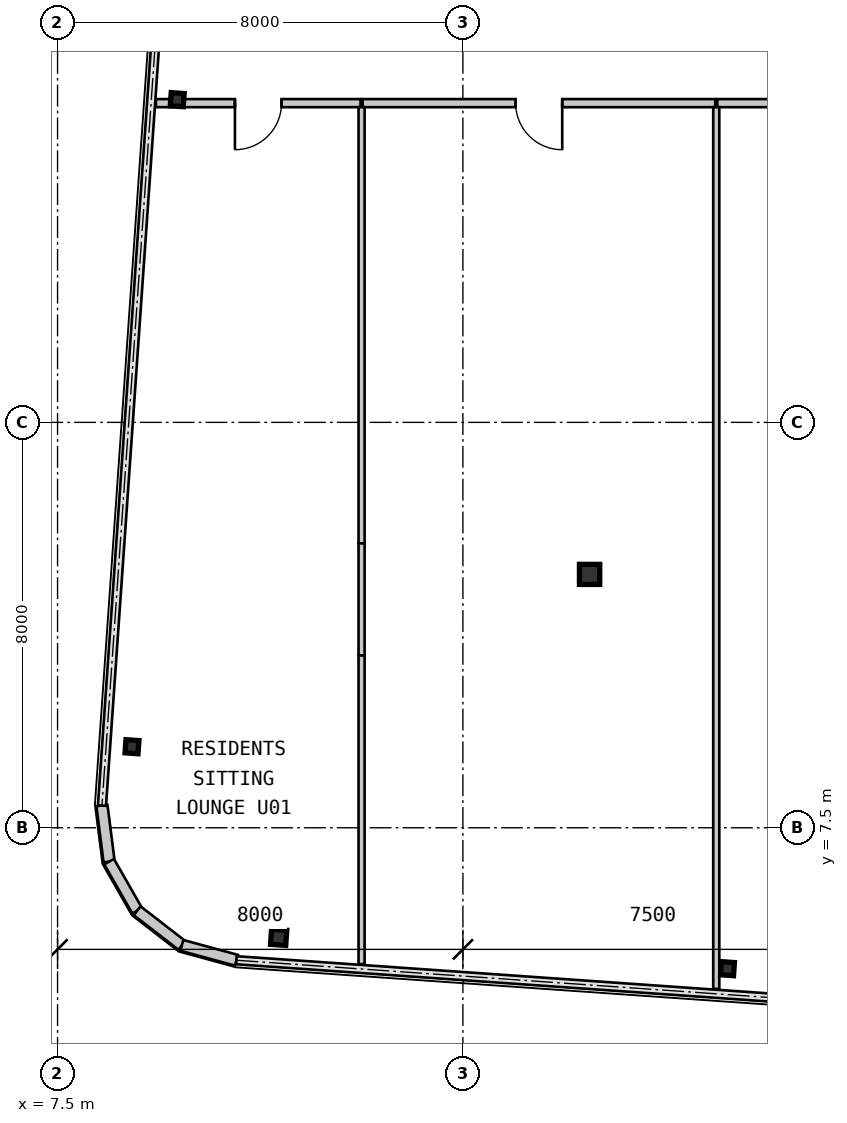
"""IFC4 building model, lengths in metres.
Left out: names, types, materials, properties, quantities, classifications, styles, units other than length and angle.
Written with IfcOpenShell. Run it as: python <this file> out.ifc"""

import sys

from ifc_helpers import new_model, si_unit, direction, frame, frame_2d, origin, origin_2d, place, context, subcontext, project, spatial, rectangle, hollow_rectangle, i_section, extrude, source, transform, mapped, element, fill, save


model = new_model("IFC4")
c1 = context("Model", 3, precision=1e-05, world=origin(), true_north=direction((0.0, 1.0)))
c2 = subcontext(c1, "Body", "Model", "MODEL_VIEW")
j1 = project(units=[si_unit("LENGTHUNIT", "METRE"), si_unit("PLANEANGLEUNIT", "RADIAN")], contexts=[c1])
p1 = place(None, origin())
s1 = spatial("IfcSite", under=j1, at=p1, CompositionType="ELEMENT")
p2 = place(p1, origin())
s2 = spatial("IfcBuilding", under=s1, at=p2, CompositionType="ELEMENT")
p3 = place(p2, frame((0.0, 0.0, 151.9)))
s3 = spatial("IfcBuildingStorey", under=s2, at=p3, CompositionType="ELEMENT", Elevation=151.9)
m1 = source(origin(), c2, "Body", "SweptSolid", [
    extrude(i_section(OverallWidth=0.4, OverallDepth=0.396, WebThickness=0.022, FlangeThickness=0.034, at=origin_2d()), origin(), (0.0, 0.0, 1.0), 3.15),
])
p4 = place(p3, frame((18.0, 12.5, 0.0), z_axis=(0.0, 0.0, 1.0), x_axis=(1.0, 0.0, 0.0)))
e1 = element("IfcColumn", 1, at=p4, inside=s3, PredefinedType="COLUMN", context=c2, shape_type="MappedRepresentation", body=[
    mapped(m1, transform((0.0, 0.0, 0.0), scale=1.0)),
])
m2 = source(origin(), c2, "Body", "SweptSolid", [
    extrude(hollow_rectangle(XDim=0.3, YDim=0.3, WallThickness=0.012, at=origin_2d()), origin(), (0.0, 0.0, 1.0), 3.15),
])
p5 = place(p3, frame((11.864, 5.338, 0.0), z_axis=(0.0, 0.0, 1.0), x_axis=(0.99756405026, -0.069756473744, 0.0)))
e2 = element("IfcColumn", 2, at=p5, inside=s3, PredefinedType="COLUMN", context=c2, shape_type="MappedRepresentation", body=[
    mapped(m2, transform((0.0, 0.0, 0.0), scale=1.0)),
])
m3 = source(origin(), c2, "Body", "SweptSolid", [
    extrude(i_section(OverallWidth=0.256, OverallDepth=0.26, WebThickness=0.01, FlangeThickness=0.017, at=origin_2d()), origin(), (0.0, 0.0, 1.0), 3.15),
])
for number, where, z_axis, x_axis in (
    (3, (20.722, 4.719, 0.0), (0.0, 0.0, 1.0), (0.998, -0.07, 0.0)),
    (4, (8.969, 9.1, 0.0), (0.0, 0.0, 1.0), (0.998, -0.07, 0.0)),
    (5, (9.862, 21.868, 0.0), (0.0, 0.0, 1.0), (0.998, -0.07, 0.0)),
):
    element("IfcColumn", number, at=place(p3, frame(where, z_axis=z_axis, x_axis=x_axis)), inside=s3, PredefinedType="COLUMN", context=c2, shape_type="MappedRepresentation", body=[
        mapped(m3, transform((0.0, 0.0, 0.0), scale=1.0)),
    ])
m4 = source(origin(), c2, "Body", "SweptSolid", [
    extrude(rectangle(XDim=1.116, YDim=0.22, at=frame_2d((0.558, 0.0))), origin(), (0.0, 0.0, 1.0), 2.93),
])
for number, where, z_axis, x_axis in (
    (6, (8.376, 7.938, 0.0), (0.0, 0.0, 1.0), (0.126, -0.992, 0.0)),
    (7, (8.517, 6.831, 0.0), (0.0, 0.0, 1.0), (0.496, -0.868, 0.0)),
    (8, (9.071, 5.862, 0.0), (0.0, 0.0, 1.0), (0.791, -0.612, 0.0)),
    (9, (9.953, 5.179, 0.0), (0.0, 0.0, 1.0), (0.965, -0.263, 0.0)),
):
    element("IfcWall", number, at=place(p3, frame(where, z_axis=z_axis, x_axis=x_axis)), inside=s3, PredefinedType="SOLIDWALL", context=c2, shape_type="MappedRepresentation", body=[
        mapped(m4, transform((0.0, 0.0, 0.0), scale=1.0)),
    ])
m5 = source(origin(), c2, "Body", "SweptSolid", [
    extrude(rectangle(XDim=4.038, YDim=0.16, at=frame_2d((2.019, 0.0))), origin(), (0.0, 0.0, 1.0), 2.93),
])
p6 = place(p3, frame((13.48, 21.8, 0.0), z_axis=(0.0, 0.0, 1.0), x_axis=(-1.0, 0.0, 0.0)))
e10 = element("IfcWall", 10, at=p6, inside=s3, PredefinedType="PARTITIONING", context=c2, shape_type="MappedRepresentation", body=[
    mapped(m5, transform((0.0, 0.0, 0.0), scale=1.0)),
])
m6 = source(origin(), c2, "Body", "SweptSolid", [
    extrude(rectangle(XDim=0.92, YDim=2.1, at=frame_2d((0.46, 1.05))), frame((0.0, 0.09, 0.0), z_axis=(0.0, -1.0, 0.0), x_axis=(1.0, 0.0, 0.0)), (0.0, 0.0, 1.0), 0.18),
])
p7 = place(p6, frame((1.559, 0.0, 0.0)))
e11 = element("IfcOpeningElement", 11, at=p7, cuts=e10, PredefinedType="OPENING", context=c2, shape_type="MappedRepresentation", body=[
    mapped(m6, transform((0.0, 0.0, 0.0), scale=1.0)),
])
m7 = source(origin(), c2, "Body", "SweptSolid", [
    extrude(rectangle(XDim=6.959, YDim=0.16, at=frame_2d((3.48, 0.0))), origin(), (0.0, 0.0, 1.0), 2.93),
])
p8 = place(p3, frame((20.48, 21.8, 0.0), z_axis=(0.0, 0.0, 1.0), x_axis=(-1.0, 0.0, 0.0)))
e12 = element("IfcWall", 12, at=p8, inside=s3, PredefinedType="PARTITIONING", context=c2, shape_type="MappedRepresentation", body=[
    mapped(m7, transform((0.0, 0.0, 0.0), scale=1.0)),
])
p9 = place(p8, frame((3.02, 0.0, 0.0)))
e13 = element("IfcOpeningElement", 13, at=p9, cuts=e12, PredefinedType="OPENING", context=c2, shape_type="MappedRepresentation", body=[
    mapped(m6, transform((0.0, 0.0, 0.0), scale=1.0)),
])
m8 = source(origin(), c2, "Body", "SweptSolid", [
    extrude(rectangle(XDim=7.459, YDim=0.16, at=frame_2d((3.73, 0.0))), origin(), (0.0, 0.0, 1.0), 2.93),
])
p10 = place(p3, frame((27.98, 21.8, 0.0), z_axis=(0.0, 0.0, 1.0), x_axis=(-1.0, 0.0, 0.0)))
e14 = element("IfcWall", 14, at=p10, inside=s3, PredefinedType="PARTITIONING", context=c2, shape_type="MappedRepresentation", body=[
    mapped(m8, transform((0.0, 0.0, 0.0), scale=1.0)),
])
p11 = place(p10, frame((3.27, 0.0, 0.0)))
e15 = element("IfcOpeningElement", 15, at=p11, cuts=e14, PredefinedType="OPENING", context=c2, shape_type="MappedRepresentation", body=[
    mapped(m6, transform((0.0, 0.0, 0.0), scale=1.0)),
])
m9 = source(origin(), c2, "Body", "SweptSolid", [
    extrude(rectangle(XDim=8.607, YDim=0.12, at=frame_2d((4.304, 0.0))), origin(), (0.0, 0.0, 1.0), 2.93),
])
p12 = place(p3, frame((13.5, 21.72, 0.0), z_axis=(0.0, 0.0, 1.0), x_axis=(0.0, -1.0, 0.0)))
e16 = element("IfcWall", 16, at=p12, inside=s3, PredefinedType="PARTITIONING", context=c2, shape_type="MappedRepresentation", body=[
    mapped(m9, transform((0.0, 0.0, 0.0), scale=1.0)),
])
m10 = source(origin(), c2, "Body", "SweptSolid", [
    extrude(rectangle(XDim=2.213, YDim=0.12, at=frame_2d((1.106, 0.0))), origin(), (0.0, 0.0, 1.0), 2.397),
])
p13 = place(p3, frame((13.5, 13.113, 0.0), z_axis=(0.0, 0.0, 1.0), x_axis=(0.0, -1.0, 0.0)))
e17 = element("IfcWall", 17, at=p13, inside=s3, PredefinedType="PARTITIONING", context=c2, shape_type="MappedRepresentation", body=[
    mapped(m10, transform((0.0, 0.0, 0.0), scale=1.0)),
])
m11 = source(origin(), c2, "Body", "SweptSolid", [
    extrude(rectangle(XDim=6.091, YDim=0.12, at=frame_2d((3.045, 0.0))), origin(), (0.0, 0.0, 1.0), 2.93),
])
p14 = place(p3, frame((13.5, 10.9, 0.0), z_axis=(0.0, 0.0, 1.0), x_axis=(0.0, -1.0, 0.0)))
e18 = element("IfcWall", 18, at=p14, inside=s3, PredefinedType="PARTITIONING", context=c2, shape_type="MappedRepresentation", body=[
    mapped(m11, transform((0.0, 0.0, 0.0), scale=1.0)),
])
m12 = source(origin(), c2, "Body", "SweptSolid", [
    extrude(rectangle(XDim=17.401, YDim=0.12, at=frame_2d((8.7, 0.0))), origin(), (0.0, 0.0, 1.0), 2.93),
])
p15 = place(p3, frame((20.5, 21.72, 0.0), z_axis=(0.0, 0.0, 1.0), x_axis=(0.0, -1.0, 0.0)))
e19 = element("IfcWall", 19, at=p15, inside=s3, PredefinedType="PARTITIONING", context=c2, shape_type="MappedRepresentation", body=[
    mapped(m12, transform((0.0, 0.0, 0.0), scale=1.0)),
])
m13 = source(origin(), c2, "Body", "SweptSolid", [
    extrude(rectangle(XDim=0.92, YDim=2.1, at=frame_2d((0.46, 1.05))), frame((0.0, 0.025, 0.0), z_axis=(0.0, -1.0, 0.0), x_axis=(1.0, 0.0, 0.0)), (0.0, 0.0, 1.0), 0.05),
])
p16 = place(p7, origin())
e20 = element("IfcDoor", 20, at=p16, inside=s3, OperationType="SINGLE_SWING_RIGHT", PredefinedType="DOOR", context=c2, shape_type="MappedRepresentation", body=[
    mapped(m13, transform((0.0, 0.0, 0.0), scale=1.0)),
])
fill(e11, e20)
p17 = place(p9, origin())
e21 = element("IfcDoor", 21, at=p17, inside=s3, OperationType="SINGLE_SWING_LEFT", PredefinedType="DOOR", context=c2, shape_type="MappedRepresentation", body=[
    mapped(m13, transform((0.0, 0.0, 0.0), scale=1.0)),
])
fill(e13, e21)
save(model, sys.argv[1])
